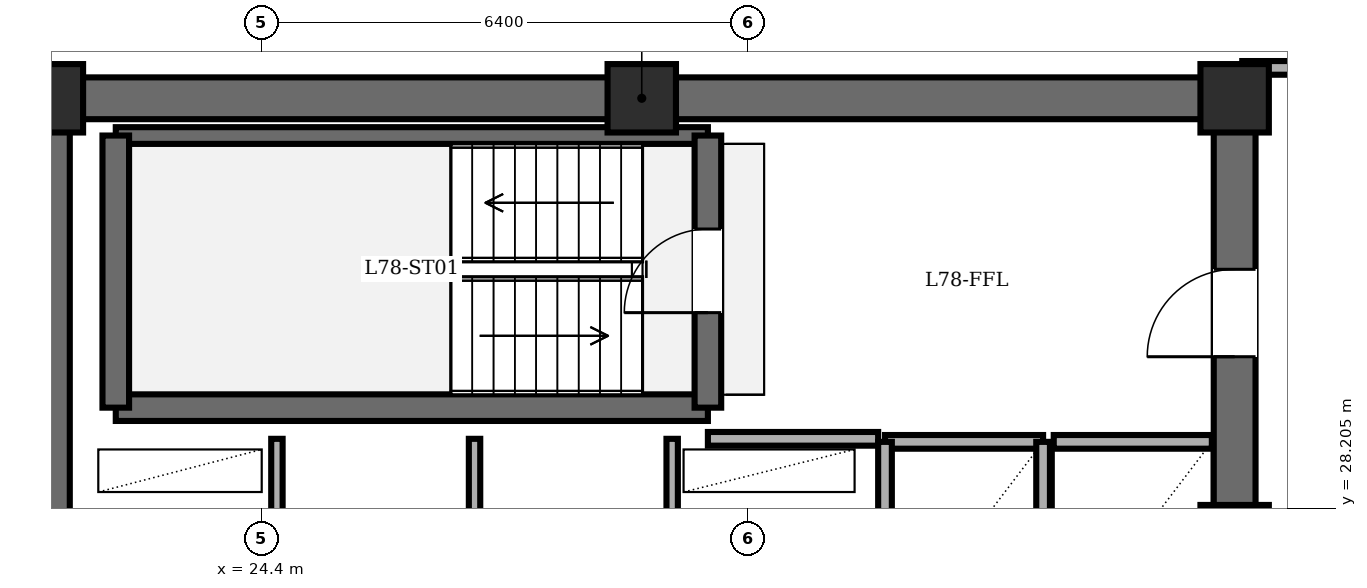
"""IFC4 building model, lengths in metres.
Left out: names, types, materials, properties, quantities, classifications, styles, units other than length and angle.
Written with IfcOpenShell. Run it as: python <this file> out.ifc"""

import sys

from ifc_helpers import new_model, si_unit, direction, frame, frame_2d, origin, origin_2d, place, context, subcontext, project, spatial, rectangle, extrude, element, fill, save


model = new_model("IFC4")
c1 = context("Model", 3, precision=1e-05, world=origin(), true_north=direction((0.0, 1.0)))
c2 = subcontext(c1, "Body", "Model", "MODEL_VIEW")
j1 = project(units=[si_unit("LENGTHUNIT", "METRE"), si_unit("PLANEANGLEUNIT", "RADIAN")], contexts=[c1])
p1 = place(None, origin())
s1 = spatial("IfcSite", under=j1, at=p1, CompositionType="ELEMENT")
p2 = place(p1, origin())
s2 = spatial("IfcBuilding", under=s1, at=p2, CompositionType="ELEMENT")
p3 = place(p2, frame((0.0, 0.0, 300.4)))
s3 = spatial("IfcBuildingStorey", under=s2, at=p3, CompositionType="ELEMENT", Elevation=300.4)
for number, where, z_axis, x_axis in (
    (1, (37.2, 27.8, 0.0), (0.0, 0.0, 1.0), (1.0, 0.0, 0.0)),
    (2, (37.2, 33.6, 0.0), (0.0, 0.0, 1.0), (1.0, 0.0, 0.0)),
    (3, (29.4, 33.6, 0.0), (0.0, 0.0, 1.0), (1.0, 0.0, 0.0)),
    (4, (21.6, 33.6, 0.0), (0.0, 0.0, 1.0), (1.0, 0.0, 0.0)),
):
    element("IfcColumn", number, at=place(p3, frame(where, z_axis=z_axis, x_axis=x_axis)), inside=s3, PredefinedType="COLUMN", context=c2, shape_type="SweptSolid", body=[
        extrude(rectangle(XDim=0.9, YDim=0.9, at=origin_2d()), origin(), (0.0, 0.0, 1.0), 7.6),
    ])
p4 = place(p3, frame((21.6, 14.4, 0.0), z_axis=(0.0, 0.0, 1.0), x_axis=(0.0, 1.0, 0.0)))
e5 = element("IfcWall", 5, at=p4, inside=s3, PredefinedType="SHEAR", context=c2, shape_type="SweptSolid", body=[
    extrude(rectangle(XDim=19.2, YDim=0.55, at=frame_2d((9.6, 0.0))), origin(), (0.0, 0.0, 1.0), 7.38),
])
p5 = place(p3, frame((21.6, 33.6, 0.0), z_axis=(0.0, 0.0, 1.0), x_axis=(1.0, 0.0, 0.0)))
e6 = element("IfcWall", 6, at=p5, inside=s3, PredefinedType="SHEAR", context=c2, shape_type="SweptSolid", body=[
    extrude(rectangle(XDim=15.6, YDim=0.55, at=frame_2d((7.8, 0.0))), origin(), (0.0, 0.0, 1.0), 7.38),
])
p6 = place(p3, frame((37.2, 14.4, 0.0), z_axis=(0.0, 0.0, 1.0), x_axis=(0.0, 1.0, 0.0)))
e7 = element("IfcWall", 7, at=p6, inside=s3, PredefinedType="SHEAR", context=c2, shape_type="SweptSolid", body=[
    extrude(rectangle(XDim=19.2, YDim=0.55, at=frame_2d((9.6, 0.0))), origin(), (0.0, 0.0, 1.0), 7.38),
])
p7 = place(p6, frame((15.8, 0.0, 0.0)))
e8 = element("IfcOpeningElement", 8, at=p7, cuts=e7, PredefinedType="OPENING", context=c2, shape_type="SweptSolid", body=[
    extrude(rectangle(XDim=1.15, YDim=2.15, at=frame_2d((0.575, 1.075))), frame((0.0, 0.285, 0.0), z_axis=(0.0, -1.0, 0.0), x_axis=(1.0, 0.0, 0.0)), (0.0, 0.0, 1.0), 0.57),
])
p8 = place(p6, frame((3.6, 0.0, 0.0)))
e9 = element("IfcOpeningElement", 9, at=p8, cuts=e7, PredefinedType="OPENING", context=c2, shape_type="SweptSolid", body=[
    extrude(rectangle(XDim=1.1, YDim=2.15, at=frame_2d((0.55, 1.075))), frame((0.0, 0.285, 0.0), z_axis=(0.0, -1.0, 0.0), x_axis=(1.0, 0.0, 0.0)), (0.0, 0.0, 1.0), 0.57),
])
p9 = place(p6, frame((8.6, 0.0, 0.0)))
e10 = element("IfcOpeningElement", 10, at=p9, cuts=e7, PredefinedType="OPENING", context=c2, shape_type="SweptSolid", body=[
    extrude(rectangle(XDim=1.4, YDim=2.25, at=frame_2d((0.7, 1.125))), frame((0.0, 0.285, 0.0), z_axis=(0.0, -1.0, 0.0), x_axis=(1.0, 0.0, 0.0)), (0.0, 0.0, 1.0), 0.57),
])
p10 = place(p3, frame((22.48, 29.53, 0.0), z_axis=(0.0, 0.0, 1.0), x_axis=(1.0, 0.0, 0.0)))
e11 = element("IfcWall", 11, at=p10, inside=s3, PredefinedType="SOLIDWALL", context=c2, shape_type="SweptSolid", body=[
    extrude(rectangle(XDim=7.79, YDim=0.35, at=frame_2d((3.895, 0.0))), origin(), (0.0, 0.0, 1.0), 7.38),
])
p11 = place(p3, frame((22.48, 33.11, 0.0), z_axis=(0.0, 0.0, 1.0), x_axis=(1.0, 0.0, 0.0)))
e12 = element("IfcWall", 12, at=p11, inside=s3, PredefinedType="PARTITIONING", context=c2, shape_type="SweptSolid", body=[
    extrude(rectangle(XDim=7.79, YDim=0.22, at=frame_2d((3.895, 0.0))), origin(), (0.0, 0.0, 1.0), 7.38),
])
p12 = place(p3, frame((22.48, 29.53, 0.0), z_axis=(0.0, 0.0, 1.0), x_axis=(0.0, 1.0, 0.0)))
e13 = element("IfcWall", 13, at=p12, inside=s3, PredefinedType="SOLIDWALL", context=c2, shape_type="SweptSolid", body=[
    extrude(rectangle(XDim=3.58, YDim=0.35, at=frame_2d((1.79, 0.0))), origin(), (0.0, 0.0, 1.0), 7.38),
])
p13 = place(p3, frame((30.27, 29.53, 0.0), z_axis=(0.0, 0.0, 1.0), x_axis=(0.0, 1.0, 0.0)))
e14 = element("IfcWall", 14, at=p13, inside=s3, PredefinedType="SOLIDWALL", context=c2, shape_type="SweptSolid", body=[
    extrude(rectangle(XDim=3.58, YDim=0.35, at=frame_2d((1.79, 0.0))), origin(), (0.0, 0.0, 1.0), 7.38),
])
p14 = place(p13, frame((1.25, 0.0, 0.0)))
e15 = element("IfcOpeningElement", 15, at=p14, cuts=e14, PredefinedType="OPENING", context=c2, shape_type="SweptSolid", body=[
    extrude(rectangle(XDim=1.1, YDim=2.15, at=frame_2d((0.55, 1.075))), frame((0.0, 0.185, 0.0), z_axis=(0.0, -1.0, 0.0), x_axis=(1.0, 0.0, 0.0)), (0.0, 0.0, 1.0), 0.37),
])
p15 = place(p3, frame((30.27, 29.12, 0.0), z_axis=(0.0, 0.0, 1.0), x_axis=(1.0, 0.0, 0.0)))
e16 = element("IfcWall", 16, at=p15, inside=s3, PredefinedType="PARTITIONING", context=c2, shape_type="SweptSolid", body=[
    extrude(rectangle(XDim=2.24, YDim=0.18, at=frame_2d((1.12, 0.0))), origin(), (0.0, 0.0, 1.0), 7.38),
])
for number, where, z_axis, x_axis in (
    (17, (24.6, 27.6, 0.0), (0.0, 0.0, 1.0), (0.0, 1.0, 0.0)),
    (18, (27.2, 27.6, 0.0), (0.0, 0.0, 1.0), (0.0, 1.0, 0.0)),
    (19, (29.8, 27.6, 0.0), (0.0, 0.0, 1.0), (0.0, 1.0, 0.0)),
):
    element("IfcWall", number, at=place(p3, frame(where, z_axis=z_axis, x_axis=x_axis)), inside=s3, PredefinedType="PARTITIONING", context=c2, shape_type="SweptSolid", body=[
        extrude(rectangle(XDim=1.52, YDim=0.15, at=frame_2d((0.76, 0.0))), origin(), (0.0, 0.0, 1.0), 7.38),
    ])
p16 = place(p3, frame((32.6, 29.08, 0.0), z_axis=(0.0, 0.0, 1.0), x_axis=(1.0, 0.0, 0.0)))
e20 = element("IfcWall", 20, at=p16, inside=s3, PredefinedType="PARTITIONING", context=c2, shape_type="SweptSolid", body=[
    extrude(rectangle(XDim=2.08, YDim=0.18, at=frame_2d((1.04, 0.0))), origin(), (0.0, 0.0, 1.0), 7.38),
])
for number, where, z_axis, x_axis in (
    (21, (34.68, 26.35, 0.0), (0.0, 0.0, 1.0), (0.0, 1.0, 0.0)),
    (22, (32.6, 29.08, 0.0), (0.0, 0.0, 1.0), (0.0, -1.0, 0.0)),
):
    element("IfcWall", number, at=place(p3, frame(where, z_axis=z_axis, x_axis=x_axis)), inside=s3, PredefinedType="PARTITIONING", context=c2, shape_type="SweptSolid", body=[
        extrude(rectangle(XDim=2.73, YDim=0.18, at=frame_2d((1.365, 0.0))), origin(), (0.0, 0.0, 1.0), 7.38),
    ])
p17 = place(p3, frame((34.82, 29.08, 0.0), z_axis=(0.0, 0.0, 1.0), x_axis=(1.0, 0.0, 0.0)))
e23 = element("IfcWall", 23, at=p17, inside=s3, PredefinedType="PARTITIONING", context=c2, shape_type="SweptSolid", body=[
    extrude(rectangle(XDim=2.08, YDim=0.18, at=frame_2d((1.04, 0.0))), origin(), (0.0, 0.0, 1.0), 7.38),
])
p18 = place(p3, frame((37.3, 34.0, 0.0), z_axis=(0.0, 0.0, 1.0), x_axis=(1.0, 0.0, 0.0)))
e24 = element("IfcWall", 24, at=p18, inside=s3, PredefinedType="PARTITIONING", context=c2, shape_type="SweptSolid", body=[
    extrude(rectangle(XDim=2.1, YDim=0.18, at=frame_2d((1.05, 0.0))), origin(), (0.0, 0.0, 1.0), 7.38),
])
p19 = place(p14, origin())
e25 = element("IfcDoor", 25, at=p19, inside=s3, OperationType="SINGLE_SWING_LEFT", PredefinedType="DOOR", context=c2, shape_type="SweptSolid", body=[
    extrude(rectangle(XDim=1.1, YDim=2.15, at=frame_2d((0.55, 1.075))), frame((0.0, 0.025, 0.0), z_axis=(0.0, -1.0, 0.0), x_axis=(1.0, 0.0, 0.0)), (0.0, 0.0, 1.0), 0.05),
])
fill(e15, e25)
p20 = place(p7, origin())
e26 = element("IfcDoor", 26, at=p20, inside=s3, OperationType="SINGLE_SWING_LEFT", PredefinedType="DOOR", context=c2, shape_type="SweptSolid", body=[
    extrude(rectangle(XDim=1.15, YDim=2.15, at=frame_2d((0.575, 1.075))), frame((0.0, 0.025, 0.0), z_axis=(0.0, -1.0, 0.0), x_axis=(1.0, 0.0, 0.0)), (0.0, 0.0, 1.0), 0.05),
])
fill(e8, e26)
save(model, sys.argv[1])
